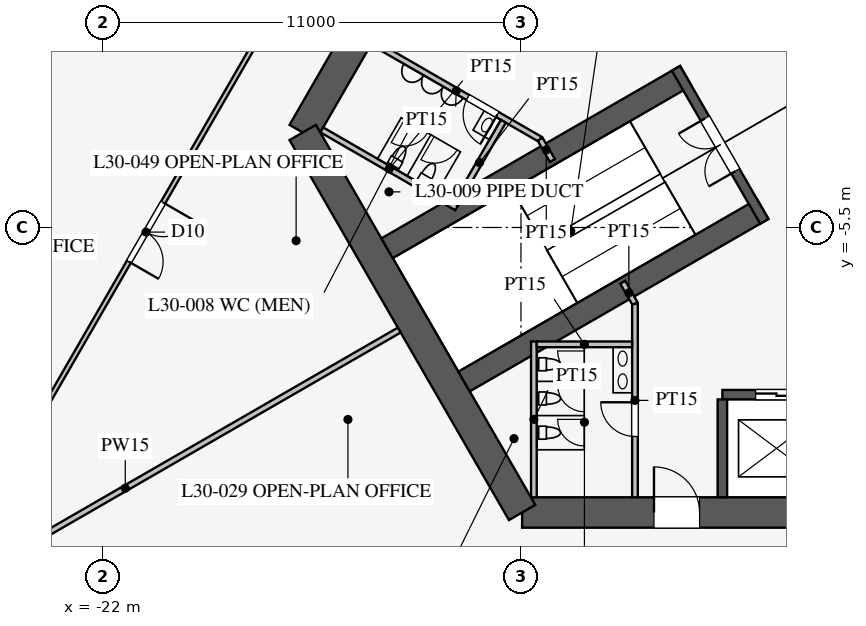
"""IFC4 building model, lengths in metres.
Left out: names, types, materials, properties, quantities, classifications, styles, units other than length and angle.
Written with IfcOpenShell. Run it as: python <this file> out.ifc"""

import sys

from ifc_helpers import new_model, si_unit, direction, frame, frame_2d, origin, place, context, subcontext, project, spatial, rectangle, extrude, element, fill, save


model = new_model("IFC4")
c1 = context("Model", 3, precision=1e-05, world=origin(), true_north=direction((0.0, 1.0)))
c2 = subcontext(c1, "Body", "Model", "MODEL_VIEW")
j1 = project(units=[si_unit("LENGTHUNIT", "METRE"), si_unit("PLANEANGLEUNIT", "RADIAN")], contexts=[c1])
p1 = place(None, origin())
s1 = spatial("IfcSite", under=j1, at=p1, CompositionType="ELEMENT")
p2 = place(p1, origin())
s2 = spatial("IfcBuilding", under=s1, at=p2, CompositionType="ELEMENT")
p3 = place(p2, frame((0.0, 0.0, 132.5)))
s3 = spatial("IfcBuildingStorey", under=s2, at=p3, CompositionType="ELEMENT", Elevation=132.5)
p4 = place(p3, frame((-10.97, -13.0, 0.0), z_axis=(0.0, 0.0, 1.0), x_axis=(1.0, 0.0, 0.0)))
e1 = element("IfcWall", 1, at=p4, inside=s3, PredefinedType="SHEAR", context=c2, shape_type="SweptSolid", body=[
    extrude(rectangle(XDim=21.939, YDim=0.8, at=frame_2d((10.97, 0.0))), origin(), (0.0, 0.0, 1.0), 4.2),
])
p5 = place(p4, frame((17.27, 0.0, 0.0)))
e2 = element("IfcOpeningElement", 2, at=p5, cuts=e1, PredefinedType="OPENING", context=c2, shape_type="SweptSolid", body=[
    extrude(rectangle(XDim=1.2, YDim=2.1, at=frame_2d((0.6, 1.05))), frame((0.0, 0.41, 0.0), z_axis=(0.0, -1.0, 0.0), x_axis=(1.0, 0.0, 0.0)), (0.0, 0.0, 1.0), 0.82),
])
p6 = place(p4, frame((3.47, 0.0, 0.0)))
e3 = element("IfcOpeningElement", 3, at=p6, cuts=e1, PredefinedType="OPENING", context=c2, shape_type="SweptSolid", body=[
    extrude(rectangle(XDim=1.2, YDim=2.1, at=frame_2d((0.6, 1.05))), frame((0.0, 0.41, 0.0), z_axis=(0.0, -1.0, 0.0), x_axis=(1.0, 0.0, 0.0)), (0.0, 0.0, 1.0), 0.82),
])
p7 = place(p3, frame((-5.773, 16.0, 0.0), z_axis=(0.0, 0.0, 1.0), x_axis=(-0.500002442456, -0.866023993627, 0.0)))
e4 = element("IfcWall", 4, at=p7, inside=s3, PredefinedType="SHEAR", context=c2, shape_type="SweptSolid", body=[
    extrude(rectangle(XDim=21.939, YDim=0.8, at=frame_2d((10.97, 0.0))), origin(), (0.0, 0.0, 1.0), 4.2),
])
p8 = place(p7, frame((17.27, 0.0, 0.0)))
e5 = element("IfcOpeningElement", 5, at=p8, cuts=e4, PredefinedType="OPENING", context=c2, shape_type="SweptSolid", body=[
    extrude(rectangle(XDim=1.2, YDim=2.1, at=frame_2d((0.6, 1.05))), frame((0.0, 0.41, 0.0), z_axis=(0.0, -1.0, 0.0), x_axis=(1.0, 0.0, 0.0)), (0.0, 0.0, 1.0), 0.82),
])
p9 = place(p7, frame((3.47, 0.0, 0.0)))
e6 = element("IfcOpeningElement", 6, at=p9, cuts=e4, PredefinedType="OPENING", context=c2, shape_type="SweptSolid", body=[
    extrude(rectangle(XDim=1.2, YDim=2.1, at=frame_2d((0.6, 1.05))), frame((0.0, 0.41, 0.0), z_axis=(0.0, -1.0, 0.0), x_axis=(1.0, 0.0, 0.0)), (0.0, 0.0, 1.0), 0.82),
])
p10 = place(p3, frame((-16.743, -3.0, 0.0), z_axis=(0.0, 0.0, 1.0), x_axis=(0.499995765644, -0.866027848477, 0.0)))
e7 = element("IfcWall", 7, at=p10, inside=s3, PredefinedType="SHEAR", context=c2, shape_type="SweptSolid", body=[
    extrude(rectangle(XDim=11.547, YDim=0.8, at=frame_2d((5.773, 0.0))), origin(), (0.0, 0.0, 1.0), 4.2),
])
p11 = place(p3, frame((-5.7, -9.9, 0.0), z_axis=(0.0, 0.0, 1.0), x_axis=(1.0, 0.0, 0.0)))
e8 = element("IfcWall", 8, at=p11, inside=s3, PredefinedType="SHEAR", context=c2, shape_type="SweptSolid", body=[
    extrude(rectangle(XDim=11.4, YDim=0.25, at=frame_2d((5.7, 0.0))), origin(), (0.0, 0.0, 1.0), 4.2),
])
p12 = place(p11, frame((0.875, 0.0, 0.0)))
e9 = element("IfcOpeningElement", 9, at=p12, cuts=e8, PredefinedType="OPENING", context=c2, shape_type="SweptSolid", body=[
    extrude(rectangle(XDim=1.1, YDim=2.2, at=frame_2d((0.55, 1.1))), frame((0.0, 0.135, 0.0), z_axis=(0.0, -1.0, 0.0), x_axis=(1.0, 0.0, 0.0)), (0.0, 0.0, 1.0), 0.27),
])
p13 = place(p11, frame((3.725, 0.0, 0.0)))
e10 = element("IfcOpeningElement", 10, at=p13, cuts=e8, PredefinedType="OPENING", context=c2, shape_type="SweptSolid", body=[
    extrude(rectangle(XDim=1.1, YDim=2.2, at=frame_2d((0.55, 1.1))), frame((0.0, 0.135, 0.0), z_axis=(0.0, -1.0, 0.0), x_axis=(1.0, 0.0, 0.0)), (0.0, 0.0, 1.0), 0.27),
])
p14 = place(p11, frame((6.575, 0.0, 0.0)))
e11 = element("IfcOpeningElement", 11, at=p14, cuts=e8, PredefinedType="OPENING", context=c2, shape_type="SweptSolid", body=[
    extrude(rectangle(XDim=1.1, YDim=2.2, at=frame_2d((0.55, 1.1))), frame((0.0, 0.135, 0.0), z_axis=(0.0, -1.0, 0.0), x_axis=(1.0, 0.0, 0.0)), (0.0, 0.0, 1.0), 0.27),
])
p15 = place(p11, frame((9.425, 0.0, 0.0)))
e12 = element("IfcOpeningElement", 12, at=p15, cuts=e8, PredefinedType="OPENING", context=c2, shape_type="SweptSolid", body=[
    extrude(rectangle(XDim=1.1, YDim=2.2, at=frame_2d((0.55, 1.1))), frame((0.0, 0.135, 0.0), z_axis=(0.0, -1.0, 0.0), x_axis=(1.0, 0.0, 0.0)), (0.0, 0.0, 1.0), 0.27),
])
p16 = place(p3, frame((-5.7, -10.025, 0.0), z_axis=(0.0, 0.0, 1.0), x_axis=(0.0, -1.0, 0.0)))
e13 = element("IfcWall", 13, at=p16, inside=s3, PredefinedType="SHEAR", context=c2, shape_type="SweptSolid", body=[
    extrude(rectangle(XDim=2.575, YDim=0.25, at=frame_2d((1.288, 0.0))), origin(), (0.0, 0.0, 1.0), 4.2),
])
for number, where, z_axis, x_axis in (
    (14, (-6.663, -1.509, 0.0), (0.0, 0.0, 1.0), (-0.866, -0.5, 0.0)),
    (15, (-4.638, -5.016, 0.0), (0.0, 0.0, 1.0), (-0.866, -0.5, 0.0)),
):
    element("IfcWall", number, at=place(p3, frame(where, z_axis=z_axis, x_axis=x_axis)), inside=s3, PredefinedType="SHEAR", context=c2, shape_type="SweptSolid", body=[
        extrude(rectangle(XDim=9.075, YDim=0.6, at=frame_2d((4.538, 0.0))), origin(), (0.0, 0.0, 1.0), 4.2),
    ])
p17 = place(p3, frame((-6.922, -1.312, 0.0), z_axis=(0.0, 0.0, 1.0), x_axis=(0.499984536904, -0.866034331223, 0.0)))
e16 = element("IfcWall", 16, at=p17, inside=s3, PredefinedType="SHEAR", context=c2, shape_type="SweptSolid", body=[
    extrude(rectangle(XDim=4.65, YDim=0.25, at=frame_2d((2.325, 0.0))), origin(), (0.0, 0.0, 1.0), 4.2),
])
p18 = place(p17, frame((1.525, 0.0, 0.0)))
e17 = element("IfcOpeningElement", 17, at=p18, cuts=e16, PredefinedType="OPENING", context=c2, shape_type="SweptSolid", body=[
    extrude(rectangle(XDim=1.6, YDim=2.1, at=frame_2d((0.8, 1.05))), frame((0.0, 0.135, 0.0), z_axis=(0.0, -1.0, 0.0), x_axis=(1.0, 0.0, 0.0)), (0.0, 0.0, 1.0), 0.27),
])
p19 = place(p3, frame((-8.0, -7.5, 0.0), z_axis=(0.0, 0.0, 1.0), x_axis=(0.0, -1.0, 0.0)))
e18 = element("IfcWall", 18, at=p19, inside=s3, PredefinedType="PARTITIONING", context=c2, shape_type="SweptSolid", body=[
    extrude(rectangle(XDim=5.1, YDim=0.15, at=frame_2d((2.55, 0.0))), origin(), (0.0, 0.0, 1.0), 4.0),
])
p20 = place(p19, frame((2.6, 0.0, 0.0)))
e19 = element("IfcOpeningElement", 19, at=p20, cuts=e18, PredefinedType="OPENING", context=c2, shape_type="SweptSolid", body=[
    extrude(rectangle(XDim=0.9, YDim=2.1, at=frame_2d((0.45, 1.05))), frame((0.0, 0.085, 0.0), z_axis=(0.0, -1.0, 0.0), x_axis=(1.0, 0.0, 0.0)), (0.0, 0.0, 1.0), 0.17),
])
p21 = place(p3, frame((-10.495, -3.178, 0.0), z_axis=(0.0, 0.0, 1.0), x_axis=(-0.86602216432, 0.500005610874, 0.0)))
e20 = element("IfcWall", 20, at=p21, inside=s3, PredefinedType="PARTITIONING", context=c2, shape_type="SweptSolid", body=[
    extrude(rectangle(XDim=5.1, YDim=0.15, at=frame_2d((2.55, 0.0))), origin(), (0.0, 0.0, 1.0), 4.0),
])
p22 = place(p21, frame((1.3, 0.0, 0.0)))
e21 = element("IfcOpeningElement", 21, at=p22, cuts=e20, PredefinedType="OPENING", context=c2, shape_type="SweptSolid", body=[
    extrude(rectangle(XDim=0.9, YDim=2.1, at=frame_2d((0.45, 1.05))), frame((0.0, 0.085, 0.0), z_axis=(0.0, -1.0, 0.0), x_axis=(1.0, 0.0, 0.0)), (0.0, 0.0, 1.0), 0.17),
])
for number, where, z_axis, x_axis in (
    (22, (-10.495, -3.178, 0.0), (0.0, 0.0, 1.0), (0.5, -0.866, 0.0)),
    (23, (-8.0, -7.5, 0.0), (0.0, 0.0, 1.0), (-0.5, 0.866, 0.0)),
):
    element("IfcWall", number, at=place(p3, frame(where, z_axis=z_axis, x_axis=x_axis)), inside=s3, PredefinedType="PARTITIONING", context=c2, shape_type="SweptSolid", body=[
        extrude(rectangle(XDim=0.645, YDim=0.15, at=frame_2d((0.323, 0.0))), origin(), (0.0, 0.0, 1.0), 4.0),
    ])
p23 = place(p3, frame((-12.691, -4.982, 0.0), z_axis=(0.0, 0.0, 1.0), x_axis=(-0.8660249478, 0.500000789788, 0.0)))
e24 = element("IfcWall", 24, at=p23, inside=s3, PredefinedType="PARTITIONING", context=c2, shape_type="SweptSolid", body=[
    extrude(rectangle(XDim=4.1, YDim=0.15, at=frame_2d((2.05, 0.0))), origin(), (0.0, 0.0, 1.0), 4.0),
])
p24 = place(p3, frame((-11.464, -2.706, 0.0), z_axis=(0.0, 0.0, 1.0), x_axis=(-0.50001992892, -0.866013897511, 0.0)))
e25 = element("IfcWall", 25, at=p24, inside=s3, PredefinedType="PARTITIONING", context=c2, shape_type="SweptSolid", body=[
    extrude(rectangle(XDim=2.51, YDim=0.15, at=frame_2d((1.255, 0.0))), origin(), (0.0, 0.0, 1.0), 4.0),
])
p25 = place(p3, frame((-10.66, -8.5, 0.0), z_axis=(0.0, 0.0, 1.0), x_axis=(0.0, -1.0, 0.0)))
e26 = element("IfcWall", 26, at=p25, inside=s3, PredefinedType="PARTITIONING", context=c2, shape_type="SweptSolid", body=[
    extrude(rectangle(XDim=4.1, YDim=0.15, at=frame_2d((2.05, 0.0))), origin(), (0.0, 0.0, 1.0), 4.0),
])
p26 = place(p3, frame((-8.075, -8.575, 0.0), z_axis=(0.0, 0.0, 1.0), x_axis=(-1.0, 0.0, 0.0)))
e27 = element("IfcWall", 27, at=p26, inside=s3, PredefinedType="PARTITIONING", context=c2, shape_type="SweptSolid", body=[
    extrude(rectangle(XDim=2.51, YDim=0.15, at=frame_2d((1.255, 0.0))), origin(), (0.0, 0.0, 1.0), 4.0),
])
p27 = place(p3, frame((-14.203, -8.2, 0.0), z_axis=(0.0, 0.0, 1.0), x_axis=(-0.866024668836, -0.500001272966, 0.0)))
e28 = element("IfcWall", 28, at=p27, inside=s3, PredefinedType="PARTITIONING", context=c2, shape_type="SweptSolid", body=[
    extrude(rectangle(XDim=16.65, YDim=0.15, at=frame_2d((8.325, 0.0))), origin(), (0.0, 0.0, 1.0), 2.3),
])
p28 = place(p3, frame((-0.016, 30.491, 0.0), z_axis=(0.0, 0.0, 1.0), x_axis=(-0.50000091641, -0.866024874695, 0.0)))
e29 = element("IfcWall", 29, at=p28, inside=s3, PredefinedType="PARTITIONING", context=c2, shape_type="SweptSolid", body=[
    extrude(rectangle(XDim=52.796, YDim=0.12, at=frame_2d((26.398, 0.0))), origin(), (0.0, 0.0, 1.0), 2.9),
])
p29 = place(p28, frame((10.2, 0.0, 0.15)))
e30 = element("IfcOpeningElement", 30, at=p29, cuts=e29, PredefinedType="OPENING", context=c2, shape_type="SweptSolid", body=[
    extrude(rectangle(XDim=1.8, YDim=2.1, at=frame_2d((0.9, 1.05))), frame((0.0, 0.07, 0.0), z_axis=(0.0, -1.0, 0.0), x_axis=(1.0, 0.0, 0.0)), (0.0, 0.0, 1.0), 0.14),
])
p30 = place(p28, frame((40.8, 0.0, 0.15)))
e31 = element("IfcOpeningElement", 31, at=p30, cuts=e29, PredefinedType="OPENING", context=c2, shape_type="SweptSolid", body=[
    extrude(rectangle(XDim=1.8, YDim=2.1, at=frame_2d((0.9, 1.05))), frame((0.0, 0.07, 0.0), z_axis=(0.0, -1.0, 0.0), x_axis=(1.0, 0.0, 0.0)), (0.0, 0.0, 1.0), 0.14),
])
p31 = place(p3, frame((-22.795, 2.768, 0.0), z_axis=(0.0, 0.0, 1.0), x_axis=(-0.41992827805, -0.90755729367, 0.0)))
e32 = element("IfcWall", 32, at=p31, inside=s3, PredefinedType="PARTITIONING", context=c2, shape_type="SweptSolid", body=[
    extrude(rectangle(XDim=4.519, YDim=0.12, at=frame_2d((2.259, 0.0))), origin(), (0.0, 0.0, 1.0), 2.9),
])
p32 = place(p31, frame((1.75, 0.0, 0.15)))
e33 = element("IfcOpeningElement", 33, at=p32, cuts=e32, PredefinedType="OPENING", context=c2, shape_type="SweptSolid", body=[
    extrude(rectangle(XDim=1.0, YDim=2.1, at=frame_2d((0.5, 1.05))), frame((0.0, 0.07, 0.0), z_axis=(0.0, -1.0, 0.0), x_axis=(1.0, 0.0, 0.0)), (0.0, 0.0, 1.0), 0.14),
])
p33 = place(p20, frame((0.9, 0.0, 0.0), z_axis=(0.0, 0.0, 1.0), x_axis=(-1.0, 0.0, 0.0)))
e34 = element("IfcDoor", 34, at=p33, inside=s3, OperationType="SINGLE_SWING_RIGHT", PredefinedType="DOOR", context=c2, shape_type="SweptSolid", body=[
    extrude(rectangle(XDim=0.9, YDim=2.1, at=frame_2d((0.45, 1.05))), frame((0.0, 0.025, 0.0), z_axis=(0.0, -1.0, 0.0), x_axis=(1.0, 0.0, 0.0)), (0.0, 0.0, 1.0), 0.05),
])
fill(e19, e34)
p34 = place(p22, origin())
e35 = element("IfcDoor", 35, at=p34, inside=s3, OperationType="SINGLE_SWING_LEFT", PredefinedType="DOOR", context=c2, shape_type="SweptSolid", body=[
    extrude(rectangle(XDim=0.9, YDim=2.1, at=frame_2d((0.45, 1.05))), frame((0.0, 0.025, 0.0), z_axis=(0.0, -1.0, 0.0), x_axis=(1.0, 0.0, 0.0)), (0.0, 0.0, 1.0), 0.05),
])
fill(e21, e35)
p35 = place(p18, frame((1.6, 0.0, 0.0), z_axis=(0.0, 0.0, 1.0), x_axis=(-1.0, 0.0, 0.0)))
e36 = element("IfcDoor", 36, at=p35, inside=s3, OperationType="DOUBLE_DOOR_SINGLE_SWING", PredefinedType="DOOR", context=c2, shape_type="SweptSolid", body=[
    extrude(rectangle(XDim=1.6, YDim=2.1, at=frame_2d((0.8, 1.05))), frame((0.0, 0.025, 0.0), z_axis=(0.0, -1.0, 0.0), x_axis=(1.0, 0.0, 0.0)), (0.0, 0.0, 1.0), 0.05),
])
fill(e17, e36)
p36 = place(p6, origin())
e37 = element("IfcDoor", 37, at=p36, inside=s3, OperationType="SINGLE_SWING_LEFT", PredefinedType="DOOR", context=c2, shape_type="SweptSolid", body=[
    extrude(rectangle(XDim=1.2, YDim=2.1, at=frame_2d((0.6, 1.05))), frame((0.0, 0.025, 0.0), z_axis=(0.0, -1.0, 0.0), x_axis=(1.0, 0.0, 0.0)), (0.0, 0.0, 1.0), 0.05),
])
fill(e3, e37)
p37 = place(p30, origin())
e38 = element("IfcDoor", 38, at=p37, inside=s3, OperationType="DOUBLE_DOOR_SINGLE_SWING", PredefinedType="DOOR", context=c2, shape_type="SweptSolid", body=[
    extrude(rectangle(XDim=1.8, YDim=2.1, at=frame_2d((0.9, 1.05))), frame((0.0, 0.025, 0.0), z_axis=(0.0, -1.0, 0.0), x_axis=(1.0, 0.0, 0.0)), (0.0, 0.0, 1.0), 0.05),
])
fill(e31, e38)
p38 = place(p12, origin())
e39 = element("IfcDoor", 39, at=p38, inside=s3, OperationType="DOUBLE_DOOR_SLIDING", PredefinedType="DOOR", context=c2, shape_type="SweptSolid", body=[
    extrude(rectangle(XDim=1.1, YDim=2.2, at=frame_2d((0.55, 1.1))), frame((0.0, 0.025, 0.0), z_axis=(0.0, -1.0, 0.0), x_axis=(1.0, 0.0, 0.0)), (0.0, 0.0, 1.0), 0.05),
])
fill(e9, e39)
save(model, sys.argv[1])
